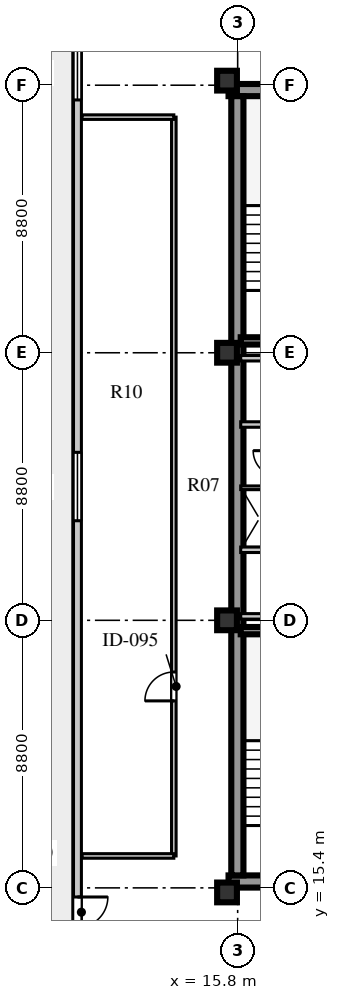
"""IFC4 building model, lengths in metres.
Left out: names, types, materials, properties, quantities, classifications, styles, units other than length and angle.
Written with IfcOpenShell. Run it as: python <this file> out.ifc"""

import sys

from ifc_helpers import new_model, si_unit, direction, frame, frame_2d, origin, origin_2d, place, context, subcontext, project, spatial, rectangle, extrude, element, fill, save


model = new_model("IFC4")
c1 = context("Model", 3, precision=1e-05, world=origin(), true_north=direction((0.0, 1.0)))
c2 = subcontext(c1, "Body", "Model", "MODEL_VIEW")
j1 = project(units=[si_unit("LENGTHUNIT", "METRE"), si_unit("PLANEANGLEUNIT", "RADIAN")], contexts=[c1])
p1 = place(None, origin())
s1 = spatial("IfcSite", under=j1, at=p1, CompositionType="ELEMENT")
p2 = place(p1, origin())
s2 = spatial("IfcBuilding", under=s1, at=p2, CompositionType="ELEMENT")
p3 = place(p2, frame((0.0, 0.0, 312.5)))
s3 = spatial("IfcBuildingStorey", under=s2, at=p3, CompositionType="ELEMENT", Elevation=312.5)
for number, where, z_axis, x_axis in (
    (1, (15.5, 15.61, 0.0), (0.0, 0.0, 1.0), (1.0, 0.0, 0.0)),
    (2, (15.5, 41.64, 0.0), (0.0, 0.0, 1.0), (1.0, 0.0, 0.0)),
):
    element("IfcWall", number, at=place(p3, frame(where, z_axis=z_axis, x_axis=x_axis)), inside=s3, PredefinedType="SHEAR", context=c2, shape_type="SweptSolid", body=[
        extrude(rectangle(XDim=9.48, YDim=0.4, at=frame_2d((4.74, 0.0))), origin(), (0.0, 0.0, 1.0), 3.56),
    ])
p4 = place(p3, frame((15.79, 15.81, 0.0), z_axis=(0.0, 0.0, 1.0), x_axis=(0.0, 1.0, 0.0)))
e3 = element("IfcWall", 3, at=p4, inside=s3, PredefinedType="SHEAR", context=c2, shape_type="SweptSolid", body=[
    extrude(rectangle(XDim=25.63, YDim=0.4, at=frame_2d((12.815, 0.0))), origin(), (0.0, 0.0, 1.0), 3.56),
])
for number, where, z_axis, x_axis in (
    (4, (15.45, 15.25, 0.0), (0.0, 0.0, 1.0), (1.0, 0.0, 0.0)),
    (5, (15.45, 24.2, 0.0), (0.0, 0.0, 1.0), (1.0, 0.0, 0.0)),
    (6, (15.45, 33.0, 0.0), (0.0, 0.0, 1.0), (1.0, 0.0, 0.0)),
    (7, (15.45, 41.95, 0.0), (0.0, 0.0, 1.0), (1.0, 0.0, 0.0)),
):
    element("IfcColumn", number, at=place(p3, frame(where, z_axis=z_axis, x_axis=x_axis)), inside=s3, PredefinedType="COLUMN", context=c2, shape_type="SweptSolid", body=[
        extrude(rectangle(XDim=0.65, YDim=0.65, at=origin_2d()), origin(), (0.0, 0.0, 1.0), 3.56),
    ])
p5 = place(p3, frame((10.53, 43.79, 0.0), z_axis=(0.0, 0.0, 1.0), x_axis=(0.0, -1.0, 0.0)))
e8 = element("IfcWall", 8, at=p5, inside=s3, PredefinedType="SOLIDWALL", context=c2, shape_type="SweptSolid", body=[
    extrude(rectangle(XDim=30.38, YDim=0.26, at=frame_2d((15.19, 0.0))), origin(), (0.0, 0.0, 1.0), 3.56),
])
p6 = place(p5, frame((28.69, 0.0, 0.0)))
e9 = element("IfcOpeningElement", 9, at=p6, cuts=e8, PredefinedType="OPENING", context=c2, shape_type="SweptSolid", body=[
    extrude(rectangle(XDim=1.0, YDim=2.05, at=frame_2d((0.5, 1.025))), frame((0.0, 0.14, 0.0), z_axis=(0.0, -1.0, 0.0), x_axis=(1.0, 0.0, 0.0)), (0.0, 0.0, 1.0), 0.28),
])
p7 = place(p5, frame((14.065, 0.0, 0.8)))
e10 = element("IfcOpeningElement", 10, at=p7, cuts=e8, PredefinedType="OPENING", context=c2, shape_type="SweptSolid", body=[
    extrude(rectangle(XDim=2.25, YDim=2.0, at=frame_2d((1.125, 1.0))), frame((0.0, 0.14, 0.0), z_axis=(0.0, -1.0, 0.0), x_axis=(1.0, 0.0, 0.0)), (0.0, 0.0, 1.0), 0.28),
])
p8 = place(p5, frame((0.675, 0.0, 0.8)))
e11 = element("IfcOpeningElement", 11, at=p8, cuts=e8, PredefinedType="OPENING", context=c2, shape_type="SweptSolid", body=[
    extrude(rectangle(XDim=1.8, YDim=2.0, at=frame_2d((0.9, 1.0))), frame((0.0, 0.14, 0.0), z_axis=(0.0, -1.0, 0.0), x_axis=(1.0, 0.0, 0.0)), (0.0, 0.0, 1.0), 0.28),
])
p9 = place(p3, frame((15.9, 23.86, 0.0), z_axis=(0.0, 0.0, 1.0), x_axis=(1.0, 0.0, 0.0)))
e12 = element("IfcWall", 12, at=p9, inside=s3, PredefinedType="SHEAR", context=c2, shape_type="SweptSolid", body=[
    extrude(rectangle(XDim=3.52, YDim=0.24, at=frame_2d((1.76, 0.0))), origin(), (0.0, 0.0, 1.0), 3.8),
])
p10 = place(p3, frame((15.9, 26.52, 0.0), z_axis=(0.0, 0.0, 1.0), x_axis=(1.0, 0.0, 0.0)))
e13 = element("IfcWall", 13, at=p10, inside=s3, PredefinedType="SOLIDWALL", context=c2, shape_type="SweptSolid", body=[
    extrude(rectangle(XDim=8.68, YDim=0.18, at=frame_2d((4.34, 0.0))), origin(), (0.0, 0.0, 1.0), 3.56),
])
p11 = place(p10, frame((2.05, 0.0, 0.0)))
e14 = element("IfcOpeningElement", 14, at=p11, cuts=e13, PredefinedType="OPENING", context=c2, shape_type="SweptSolid", body=[
    extrude(rectangle(XDim=0.85, YDim=2.06, at=frame_2d((0.425, 1.03))), frame((0.0, 0.1, 0.0), z_axis=(0.0, -1.0, 0.0), x_axis=(1.0, 0.0, 0.0)), (0.0, 0.0, 1.0), 0.2),
])
p12 = place(p10, frame((5.2, 0.0, 0.0)))
e15 = element("IfcOpeningElement", 15, at=p12, cuts=e13, PredefinedType="OPENING", context=c2, shape_type="SweptSolid", body=[
    extrude(rectangle(XDim=0.95, YDim=2.1, at=frame_2d((0.475, 1.05))), frame((0.0, 0.1, 0.0), z_axis=(0.0, -1.0, 0.0), x_axis=(1.0, 0.0, 0.0)), (0.0, 0.0, 1.0), 0.2),
])
p13 = place(p3, frame((15.9, 24.33, 0.0), z_axis=(0.0, 0.0, 1.0), x_axis=(1.0, 0.0, 0.0)))
e16 = element("IfcWall", 16, at=p13, inside=s3, PredefinedType="SOLIDWALL", context=c2, shape_type="SweptSolid", body=[
    extrude(rectangle(XDim=8.68, YDim=0.18, at=frame_2d((4.34, 0.0))), origin(), (0.0, 0.0, 1.0), 2.96),
])
p14 = place(p3, frame((15.9, 28.56, 0.0), z_axis=(0.0, 0.0, 1.0), x_axis=(1.0, 0.0, 0.0)))
e17 = element("IfcWall", 17, at=p14, inside=s3, PredefinedType="PARTITIONING", context=c2, shape_type="SweptSolid", body=[
    extrude(rectangle(XDim=1.2, YDim=0.12, at=frame_2d((0.6, 0.0))), origin(), (0.0, 0.0, 1.0), 3.56),
])
p15 = place(p3, frame((15.9, 30.64, 0.0), z_axis=(0.0, 0.0, 1.0), x_axis=(1.0, 0.0, 0.0)))
e18 = element("IfcWall", 18, at=p15, inside=s3, PredefinedType="SOLIDWALL", context=c2, shape_type="SweptSolid", body=[
    extrude(rectangle(XDim=8.68, YDim=0.18, at=frame_2d((4.34, 0.0))), origin(), (0.0, 0.0, 1.0), 3.56),
])
p16 = place(p15, frame((3.7, 0.0, 0.0)))
e19 = element("IfcOpeningElement", 19, at=p16, cuts=e18, PredefinedType="OPENING", context=c2, shape_type="SweptSolid", body=[
    extrude(rectangle(XDim=0.95, YDim=2.1, at=frame_2d((0.475, 1.05))), frame((0.0, 0.1, 0.0), z_axis=(0.0, -1.0, 0.0), x_axis=(1.0, 0.0, 0.0)), (0.0, 0.0, 1.0), 0.2),
])
p17 = place(p3, frame((15.9, 32.82, 0.0), z_axis=(0.0, 0.0, 1.0), x_axis=(1.0, 0.0, 0.0)))
e20 = element("IfcWall", 20, at=p17, inside=s3, PredefinedType="SOLIDWALL", context=c2, shape_type="SweptSolid", body=[
    extrude(rectangle(XDim=8.68, YDim=0.18, at=frame_2d((4.34, 0.0))), origin(), (0.0, 0.0, 1.0), 2.96),
])
p18 = place(p3, frame((15.9, 33.39, 0.0), z_axis=(0.0, 0.0, 1.0), x_axis=(1.0, 0.0, 0.0)))
e21 = element("IfcWall", 21, at=p18, inside=s3, PredefinedType="SHEAR", context=c2, shape_type="SweptSolid", body=[
    extrude(rectangle(XDim=3.52, YDim=0.24, at=frame_2d((1.76, 0.0))), origin(), (0.0, 0.0, 1.0), 3.8),
])
p19 = place(p3, frame((13.7, 16.45, 0.0), z_axis=(0.0, 0.0, 1.0), x_axis=(0.0, 1.0, 0.0)))
e22 = element("IfcWall", 22, at=p19, inside=s3, PredefinedType="PARTITIONING", context=c2, shape_type="SweptSolid", body=[
    extrude(rectangle(XDim=24.3, YDim=0.15, at=frame_2d((12.15, 0.0))), origin(), (0.0, 0.0, 1.0), 3.56),
])
p20 = place(p19, frame((5.1, 0.0, 0.0)))
e23 = element("IfcOpeningElement", 23, at=p20, cuts=e22, PredefinedType="OPENING", context=c2, shape_type="SweptSolid", body=[
    extrude(rectangle(XDim=0.95, YDim=2.08, at=frame_2d((0.475, 1.04))), frame((0.0, 0.085, 0.0), z_axis=(0.0, -1.0, 0.0), x_axis=(1.0, 0.0, 0.0)), (0.0, 0.0, 1.0), 0.17),
])
for number, where, z_axis, x_axis in (
    (24, (10.68, 16.45, 0.0), (0.0, 0.0, 1.0), (1.0, 0.0, 0.0)),
    (25, (10.68, 40.75, 0.0), (0.0, 0.0, 1.0), (1.0, 0.0, 0.0)),
):
    element("IfcWall", number, at=place(p3, frame(where, z_axis=z_axis, x_axis=x_axis)), inside=s3, PredefinedType="PARTITIONING", context=c2, shape_type="SweptSolid", body=[
        extrude(rectangle(XDim=3.02, YDim=0.15, at=frame_2d((1.51, 0.0))), origin(), (0.0, 0.0, 1.0), 3.56),
    ])
p21 = place(p6, frame((1.0, 0.0, 0.0), z_axis=(0.0, 0.0, 1.0), x_axis=(-1.0, 0.0, 0.0)))
e26 = element("IfcDoor", 26, at=p21, inside=s3, OperationType="SINGLE_SWING_RIGHT", PredefinedType="DOOR", context=c2, shape_type="SweptSolid", body=[
    extrude(rectangle(XDim=1.0, YDim=2.05, at=frame_2d((0.5, 1.025))), frame((0.0, 0.025, 0.0), z_axis=(0.0, -1.0, 0.0), x_axis=(1.0, 0.0, 0.0)), (0.0, 0.0, 1.0), 0.05),
])
fill(e9, e26)
p22 = place(p7, origin())
e27 = element("IfcWindow", 27, at=p22, inside=s3, PartitioningType="SINGLE_PANEL", PredefinedType="WINDOW", context=c2, shape_type="SweptSolid", body=[
    extrude(rectangle(XDim=2.25, YDim=2.0, at=frame_2d((1.125, 1.0))), frame((0.0, 0.03, 0.0), z_axis=(0.0, -1.0, 0.0), x_axis=(1.0, 0.0, 0.0)), (0.0, 0.0, 1.0), 0.06),
])
fill(e10, e27)
p23 = place(p8, origin())
e28 = element("IfcWindow", 28, at=p23, inside=s3, PartitioningType="SINGLE_PANEL", PredefinedType="WINDOW", context=c2, shape_type="SweptSolid", body=[
    extrude(rectangle(XDim=1.8, YDim=2.0, at=frame_2d((0.9, 1.0))), frame((0.0, 0.03, 0.0), z_axis=(0.0, -1.0, 0.0), x_axis=(1.0, 0.0, 0.0)), (0.0, 0.0, 1.0), 0.06),
])
fill(e11, e28)
p24 = place(p20, origin())
e29 = element("IfcDoor", 29, at=p24, inside=s3, OperationType="SINGLE_SWING_LEFT", PredefinedType="DOOR", context=c2, shape_type="SweptSolid", body=[
    extrude(rectangle(XDim=0.95, YDim=2.08, at=frame_2d((0.475, 1.04))), frame((0.0, 0.025, 0.0), z_axis=(0.0, -1.0, 0.0), x_axis=(1.0, 0.0, 0.0)), (0.0, 0.0, 1.0), 0.05),
])
fill(e23, e29)
save(model, sys.argv[1])
